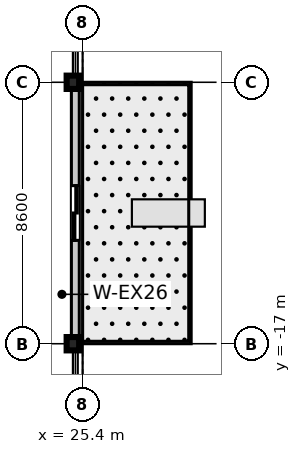
"""IFC4 building model, lengths in metres.
Left out: names, types, materials, properties, quantities, classifications, styles, units other than length and angle.
Written with IfcOpenShell. Run it as: python <this file> out.ifc"""

import sys

from ifc_helpers import new_model, si_unit, direction, frame, frame_2d, origin, origin_2d, place, context, subcontext, project, spatial, rectangle, i_section, extrude, source, transform, mapped, element, fill, save


model = new_model("IFC4")
c1 = context("Model", 3, precision=1e-05, world=origin(), true_north=direction((0.0, 1.0)))
c2 = subcontext(c1, "Body", "Model", "MODEL_VIEW")
j1 = project(units=[si_unit("LENGTHUNIT", "METRE"), si_unit("PLANEANGLEUNIT", "RADIAN")], contexts=[c1])
p1 = place(None, origin())
s1 = spatial("IfcSite", under=j1, at=p1, CompositionType="ELEMENT")
p2 = place(p1, origin())
s2 = spatial("IfcBuilding", under=s1, at=p2, CompositionType="ELEMENT")
p3 = place(p2, frame((0.0, 0.0, 54.3)))
s3 = spatial("IfcBuildingStorey", under=s2, at=p3, CompositionType="ELEMENT", Elevation=54.3)
m1 = source(origin(), c2, "Body", "SweptSolid", [
    extrude(i_section(OverallWidth=0.412, OverallDepth=0.438, WebThickness=0.023, FlangeThickness=0.036, at=origin_2d()), origin(), (0.0, 0.0, 1.0), 3.605),
])
for number, where, z_axis, x_axis in (
    (1, (25.08, -17.0, 0.0), (0.0, 0.0, 1.0), (1.0, 0.0, 0.0)),
    (2, (25.08, -8.4, 0.0), (0.0, 0.0, 1.0), (1.0, 0.0, 0.0)),
):
    element("IfcColumn", number, at=place(p3, frame(where, z_axis=z_axis, x_axis=x_axis)), inside=s3, PredefinedType="COLUMN", context=c2, shape_type="MappedRepresentation", body=[
        mapped(m1, transform((0.0, 0.0, 0.0), scale=1.0)),
    ])
m2 = source(origin(), c2, "Body", "SweptSolid", [
    extrude(rectangle(XDim=8.6, YDim=0.26, at=frame_2d((4.3, 0.0))), origin(), (0.0, 0.0, 1.0), 2.85),
])
p4 = place(p3, frame((25.16, -17.0, 0.0), z_axis=(0.0, 0.0, 1.0), x_axis=(0.0, 1.0, 0.0)))
e3 = element("IfcWall", 3, at=p4, inside=s3, PredefinedType="STANDARD", context=c2, shape_type="MappedRepresentation", body=[
    mapped(m2, transform((0.0, 0.0, 0.0), scale=1.0)),
])
p5 = place(p4, frame((3.4, 0.0, 0.0)))
e4 = element("IfcOpeningElement", 4, at=p5, cuts=e3, PredefinedType="OPENING", context=c2, shape_type="SweptSolid", body=[
    extrude(rectangle(XDim=1.8, YDim=2.25, at=frame_2d((0.9, 1.125))), frame((0.0, 0.14, 0.0), z_axis=(0.0, -1.0, 0.0), x_axis=(1.0, 0.0, 0.0)), (0.0, 0.0, 1.0), 0.28),
])
m3 = source(origin(), c2, "Body", "SweptSolid", [
    extrude(rectangle(XDim=1.8, YDim=2.25, at=frame_2d((0.9, 1.125))), frame((0.0, 0.025, 0.0), z_axis=(0.0, -1.0, 0.0), x_axis=(1.0, 0.0, 0.0)), (0.0, 0.0, 1.0), 0.05),
])
p6 = place(p5, frame((1.8, 0.0, 0.0), z_axis=(0.0, 0.0, 1.0), x_axis=(-1.0, 0.0, 0.0)))
e5 = element("IfcDoor", 5, at=p6, inside=s3, OperationType="DOUBLE_DOOR_SLIDING", PredefinedType="DOOR", context=c2, shape_type="MappedRepresentation", body=[
    mapped(m3, transform((0.0, 0.0, 0.0), scale=1.0)),
])
fill(e4, e5)
save(model, sys.argv[1])
